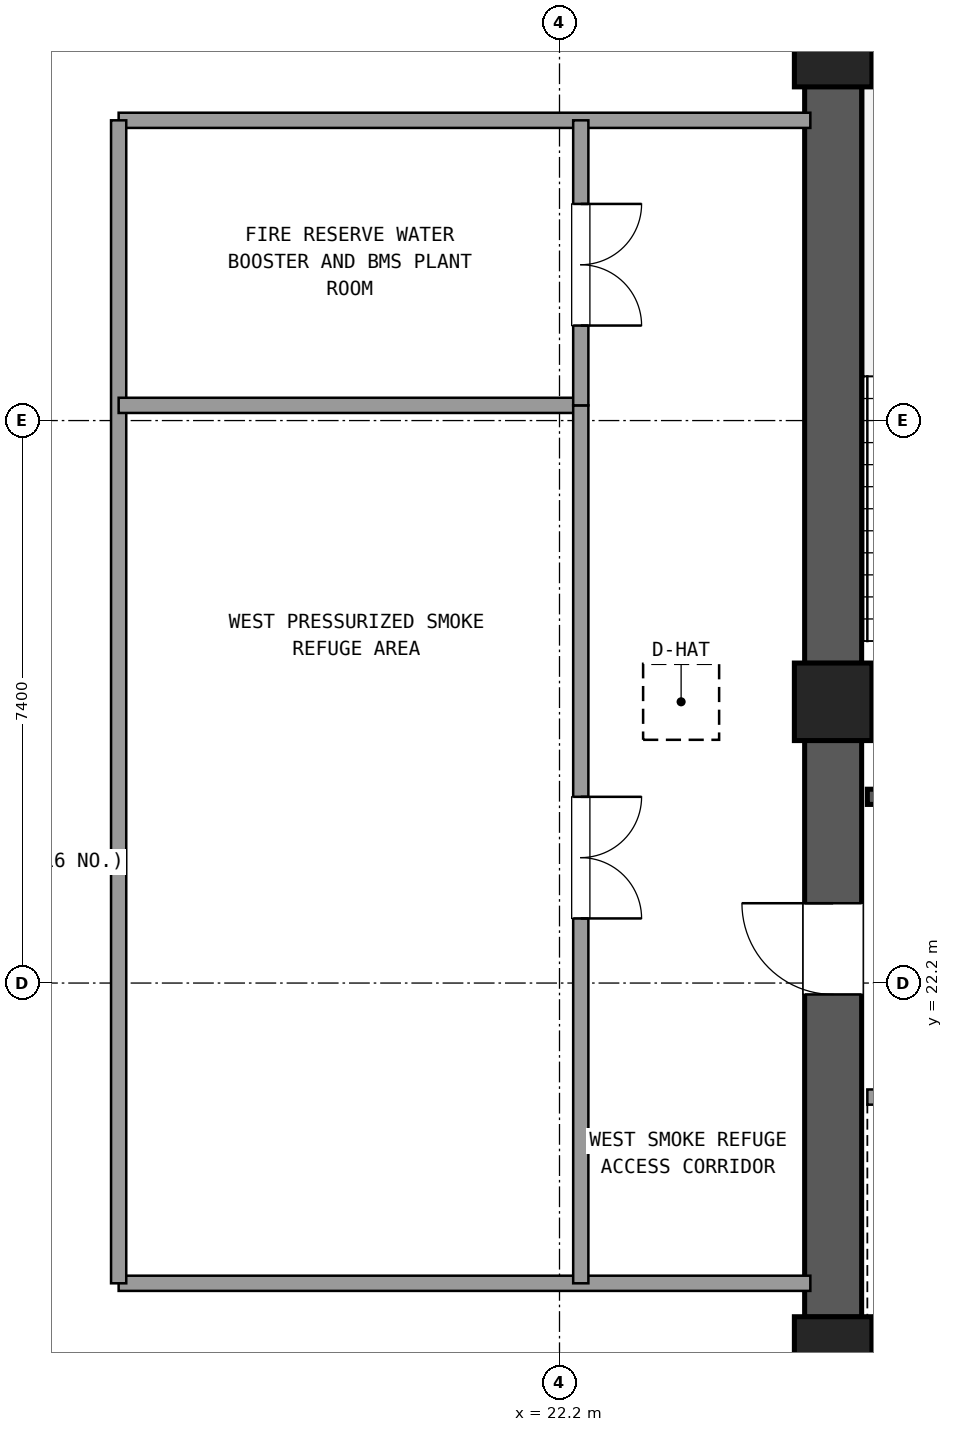
"""IFC4 building model, lengths in metres.
Left out: names, types, materials, properties, quantities, classifications, styles, units other than length and angle.
Written with IfcOpenShell. Run it as: python <this file> out.ifc"""

import sys

from ifc_helpers import new_model, si_unit, direction, frame, frame_2d, origin, origin_2d, place, context, subcontext, project, spatial, rectangle, extrude, element, fill, save


model = new_model("IFC4")
c1 = context("Model", 3, precision=1e-05, world=origin(), true_north=direction((0.0, 1.0)))
c2 = subcontext(c1, "Body", "Model", "MODEL_VIEW")
j1 = project(units=[si_unit("LENGTHUNIT", "METRE"), si_unit("PLANEANGLEUNIT", "RADIAN")], contexts=[c1])
p1 = place(None, origin())
s1 = spatial("IfcSite", under=j1, at=p1, CompositionType="ELEMENT")
p2 = place(p1, origin())
s2 = spatial("IfcBuilding", under=s1, at=p2, CompositionType="ELEMENT")
p3 = place(p2, frame((0.0, 0.0, 178.02)))
s3 = spatial("IfcBuildingStorey", under=s2, at=p3, CompositionType="ELEMENT", Elevation=178.02)
for number, where, z_axis, x_axis in (
    (1, (25.8, 17.3, 0.0), (0.0, 0.0, 1.0), (1.0, 0.0, 0.0)),
    (2, (25.8, 34.5, 0.0), (0.0, 0.0, 1.0), (1.0, 0.0, 0.0)),
    (3, (25.8, 25.9, 0.0), (0.0, 0.0, 1.0), (1.0, 0.0, 0.0)),
):
    element("IfcColumn", number, at=place(p3, frame(where, z_axis=z_axis, x_axis=x_axis)), inside=s3, PredefinedType="COLUMN", context=c2, shape_type="SweptSolid", body=[
        extrude(rectangle(XDim=1.02, YDim=1.02, at=origin_2d()), origin(), (0.0, 0.0, 1.0), 4.68),
    ])
p4 = place(p3, frame((26.305, 17.3, 0.0), z_axis=(0.0, 0.0, 1.0), x_axis=(1.0, 0.0, 0.0)))
e4 = element("IfcWall", 4, at=p4, inside=s3, PredefinedType="SHEAR", context=c2, shape_type="SweptSolid", body=[
    extrude(rectangle(XDim=10.19, YDim=0.75, at=frame_2d((5.095, 0.0))), origin(), (0.0, 0.0, 1.0), 4.38),
])
p5 = place(p3, frame((36.495, 34.5, 0.0), z_axis=(0.0, 0.0, 1.0), x_axis=(-1.0, 0.0, 0.0)))
e5 = element("IfcWall", 5, at=p5, inside=s3, PredefinedType="SHEAR", context=c2, shape_type="SweptSolid", body=[
    extrude(rectangle(XDim=10.19, YDim=0.75, at=frame_2d((5.095, 0.0))), origin(), (0.0, 0.0, 1.0), 4.38),
])
p6 = place(p5, frame((4.095, 0.0, 0.0)))
e6 = element("IfcOpeningElement", 6, at=p6, cuts=e5, PredefinedType="OPENING", context=c2, shape_type="SweptSolid", body=[
    extrude(rectangle(XDim=1.2, YDim=2.15, at=frame_2d((0.6, 1.075))), frame((0.0, 0.385, 0.0), z_axis=(0.0, -1.0, 0.0), x_axis=(1.0, 0.0, 0.0)), (0.0, 0.0, 1.0), 0.77),
])
p7 = place(p3, frame((25.8, 33.995, 0.0), z_axis=(0.0, 0.0, 1.0), x_axis=(0.0, -1.0, 0.0)))
e7 = element("IfcWall", 7, at=p7, inside=s3, PredefinedType="SHEAR", context=c2, shape_type="SweptSolid", body=[
    extrude(rectangle(XDim=7.59, YDim=0.75, at=frame_2d((3.795, 0.0))), origin(), (0.0, 0.0, 1.0), 4.38),
])
p8 = place(p3, frame((25.8, 25.395, 0.0), z_axis=(0.0, 0.0, 1.0), x_axis=(0.0, -1.0, 0.0)))
e8 = element("IfcWall", 8, at=p8, inside=s3, PredefinedType="SHEAR", context=c2, shape_type="SweptSolid", body=[
    extrude(rectangle(XDim=7.59, YDim=0.75, at=frame_2d((3.795, 0.0))), origin(), (0.0, 0.0, 1.0), 4.38),
])
p9 = place(p8, frame((2.145, 0.0, 0.0)))
e9 = element("IfcOpeningElement", 9, at=p9, cuts=e8, PredefinedType="OPENING", context=c2, shape_type="SweptSolid", body=[
    extrude(rectangle(XDim=1.2, YDim=2.15, at=frame_2d((0.6, 1.075))), frame((0.0, 0.385, 0.0), z_axis=(0.0, -1.0, 0.0), x_axis=(1.0, 0.0, 0.0)), (0.0, 0.0, 1.0), 0.77),
])
p10 = place(p3, frame((26.25, 24.65, 0.0), z_axis=(0.0, 0.0, 1.0), x_axis=(1.0, 0.0, 0.0)))
e10 = element("IfcWall", 10, at=p10, inside=s3, PredefinedType="SHEAR", context=c2, shape_type="SweptSolid", body=[
    extrude(rectangle(XDim=4.0, YDim=0.2, at=frame_2d((2.0, 0.0))), origin(), (0.0, 0.0, 1.0), 4.38),
])
p11 = place(p10, frame((1.0, 0.0, 0.0)))
e11 = element("IfcOpeningElement", 11, at=p11, cuts=e10, PredefinedType="OPENING", context=c2, shape_type="SweptSolid", body=[
    extrude(rectangle(XDim=1.2, YDim=2.15, at=frame_2d((0.6, 1.075))), frame((0.0, 0.11, 0.0), z_axis=(0.0, -1.0, 0.0), x_axis=(1.0, 0.0, 0.0)), (0.0, 0.0, 1.0), 0.22),
])
p12 = place(p3, frame((26.25, 20.7, 0.0), z_axis=(0.0, 0.0, 1.0), x_axis=(1.0, 0.0, 0.0)))
e12 = element("IfcWall", 12, at=p12, inside=s3, PredefinedType="SOLIDWALL", context=c2, shape_type="SweptSolid", body=[
    extrude(rectangle(XDim=4.0, YDim=0.2, at=frame_2d((2.0, 0.0))), origin(), (0.0, 0.0, 1.0), 3.49),
])
p13 = place(p12, frame((0.65, 0.0, 0.0)))
e13 = element("IfcOpeningElement", 13, at=p13, cuts=e12, PredefinedType="OPENING", context=c2, shape_type="SweptSolid", body=[
    extrude(rectangle(XDim=1.2, YDim=2.15, at=frame_2d((0.6, 1.075))), frame((0.0, 0.11, 0.0), z_axis=(0.0, -1.0, 0.0), x_axis=(1.0, 0.0, 0.0)), (0.0, 0.0, 1.0), 0.22),
])
for number, where, z_axis, x_axis in (
    (14, (16.4, 18.25, 0.0), (0.0, 0.0, 1.0), (1.0, 0.0, 0.0)),
    (15, (16.4, 33.55, 0.0), (0.0, 0.0, 1.0), (1.0, 0.0, 0.0)),
):
    element("IfcWall", number, at=place(p3, frame(where, z_axis=z_axis, x_axis=x_axis)), inside=s3, PredefinedType="SOLIDWALL", context=c2, shape_type="SweptSolid", body=[
        extrude(rectangle(XDim=9.1, YDim=0.2, at=frame_2d((4.55, 0.0))), origin(), (0.0, 0.0, 1.0), 3.49),
    ])
p14 = place(p3, frame((16.4, 18.25, 0.0), z_axis=(0.0, 0.0, 1.0), x_axis=(0.0, 1.0, 0.0)))
e16 = element("IfcWall", 16, at=p14, inside=s3, PredefinedType="SOLIDWALL", context=c2, shape_type="SweptSolid", body=[
    extrude(rectangle(XDim=15.3, YDim=0.2, at=frame_2d((7.65, 0.0))), origin(), (0.0, 0.0, 1.0), 3.49),
])
p15 = place(p3, frame((16.4, 29.8, 0.0), z_axis=(0.0, 0.0, 1.0), x_axis=(1.0, 0.0, 0.0)))
e17 = element("IfcWall", 17, at=p15, inside=s3, PredefinedType="SOLIDWALL", context=c2, shape_type="SweptSolid", body=[
    extrude(rectangle(XDim=6.08, YDim=0.2, at=frame_2d((3.04, 0.0))), origin(), (0.0, 0.0, 1.0), 3.49),
])
p16 = place(p3, frame((22.48, 18.25, 0.0), z_axis=(0.0, 0.0, 1.0), x_axis=(0.0, 1.0, 0.0)))
e18 = element("IfcWall", 18, at=p16, inside=s3, PredefinedType="SOLIDWALL", context=c2, shape_type="SweptSolid", body=[
    extrude(rectangle(XDim=11.55, YDim=0.2, at=frame_2d((5.775, 0.0))), origin(), (0.0, 0.0, 1.0), 3.49),
])
p17 = place(p16, frame((4.8, 0.0, 0.0)))
e19 = element("IfcOpeningElement", 19, at=p17, cuts=e18, PredefinedType="OPENING", context=c2, shape_type="SweptSolid", body=[
    extrude(rectangle(XDim=1.6, YDim=2.2, at=frame_2d((0.8, 1.1))), frame((0.0, 0.11, 0.0), z_axis=(0.0, -1.0, 0.0), x_axis=(1.0, 0.0, 0.0)), (0.0, 0.0, 1.0), 0.22),
])
p18 = place(p3, frame((22.48, 29.8, 0.0), z_axis=(0.0, 0.0, 1.0), x_axis=(0.0, 1.0, 0.0)))
e20 = element("IfcWall", 20, at=p18, inside=s3, PredefinedType="SOLIDWALL", context=c2, shape_type="SweptSolid", body=[
    extrude(rectangle(XDim=3.75, YDim=0.2, at=frame_2d((1.875, 0.0))), origin(), (0.0, 0.0, 1.0), 3.49),
])
p19 = place(p18, frame((1.05, 0.0, 0.0)))
e21 = element("IfcOpeningElement", 21, at=p19, cuts=e20, PredefinedType="OPENING", context=c2, shape_type="SweptSolid", body=[
    extrude(rectangle(XDim=1.6, YDim=2.2, at=frame_2d((0.8, 1.1))), frame((0.0, 0.11, 0.0), z_axis=(0.0, -1.0, 0.0), x_axis=(1.0, 0.0, 0.0)), (0.0, 0.0, 1.0), 0.22),
])
p20 = place(p3, frame((0.0, 0.0, -0.3)))
p21 = place(p20, frame((23.8, 25.9, -0.01)))
p22 = place(p21, frame((0.0, 0.0, 0.29)))
e22 = element("IfcDoor", 22, at=p22, inside=s3, OperationType="SINGLE_SWING_LEFT", PredefinedType="TRAPDOOR", context=c2, shape_type="SweptSolid", body=[
    extrude(rectangle(XDim=1.0, YDim=1.0, at=origin_2d()), origin(), (0.0, 0.0, 1.0), 0.02),
])
p23 = place(p9, frame((1.2, 0.0, 0.0), z_axis=(0.0, 0.0, 1.0), x_axis=(-1.0, 0.0, 0.0)))
e23 = element("IfcDoor", 23, at=p23, inside=s3, OperationType="SINGLE_SWING_LEFT", PredefinedType="DOOR", context=c2, shape_type="SweptSolid", body=[
    extrude(rectangle(XDim=1.2, YDim=2.15, at=frame_2d((0.6, 1.075))), frame((0.0, 0.025, 0.0), z_axis=(0.0, -1.0, 0.0), x_axis=(1.0, 0.0, 0.0)), (0.0, 0.0, 1.0), 0.05),
])
fill(e9, e23)
p24 = place(p17, frame((1.6, 0.0, 0.0), z_axis=(0.0, 0.0, 1.0), x_axis=(-1.0, 0.0, 0.0)))
e24 = element("IfcDoor", 24, at=p24, inside=s3, OperationType="DOUBLE_DOOR_SINGLE_SWING", PredefinedType="DOOR", context=c2, shape_type="SweptSolid", body=[
    extrude(rectangle(XDim=1.6, YDim=2.2, at=frame_2d((0.8, 1.1))), frame((0.0, 0.025, 0.0), z_axis=(0.0, -1.0, 0.0), x_axis=(1.0, 0.0, 0.0)), (0.0, 0.0, 1.0), 0.05),
])
fill(e19, e24)
p25 = place(p19, frame((1.6, 0.0, 0.0), z_axis=(0.0, 0.0, 1.0), x_axis=(-1.0, 0.0, 0.0)))
e25 = element("IfcDoor", 25, at=p25, inside=s3, OperationType="DOUBLE_DOOR_SINGLE_SWING", PredefinedType="DOOR", context=c2, shape_type="SweptSolid", body=[
    extrude(rectangle(XDim=1.6, YDim=2.2, at=frame_2d((0.8, 1.1))), frame((0.0, 0.025, 0.0), z_axis=(0.0, -1.0, 0.0), x_axis=(1.0, 0.0, 0.0)), (0.0, 0.0, 1.0), 0.05),
])
fill(e21, e25)
save(model, sys.argv[1])
